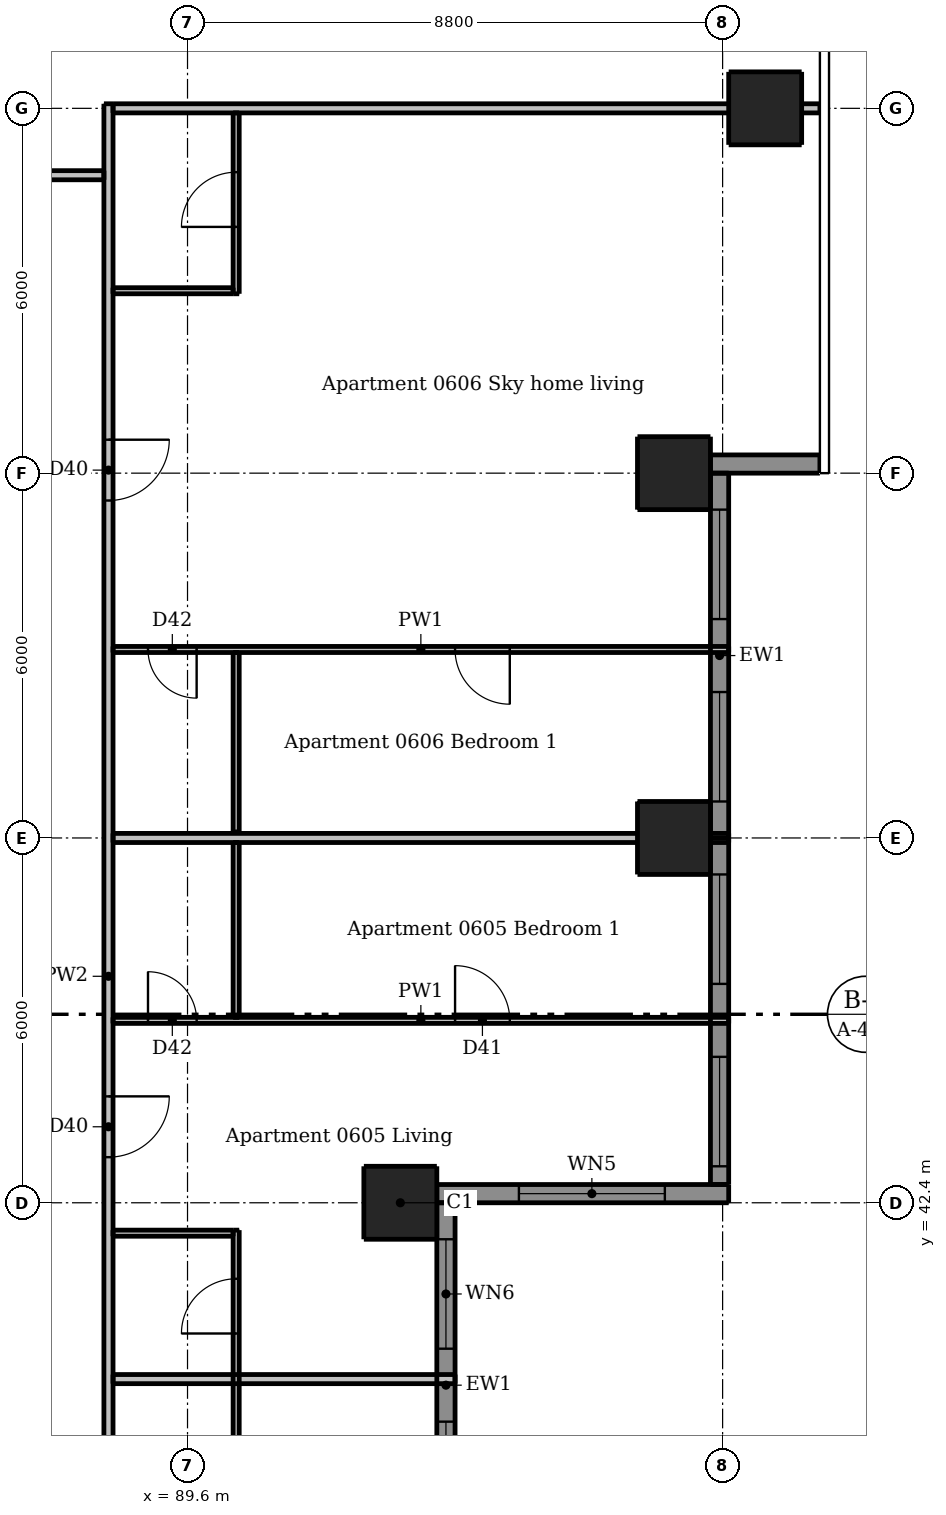
"""IFC4 building model, lengths in metres.
Left out: names, types, materials, properties, quantities, classifications, styles, units other than length and angle.
Written with IfcOpenShell. Run it as: python <this file> out.ifc"""

import sys

from ifc_helpers import new_model, si_unit, direction, frame, frame_2d, origin, origin_2d, place, context, subcontext, project, spatial, rectangle, extrude, element, fill, save


model = new_model("IFC4")
c1 = context("Model", 3, precision=1e-05, world=origin(), true_north=direction((0.0, 1.0)))
c2 = subcontext(c1, "Body", "Model", "MODEL_VIEW")
j1 = project(units=[si_unit("LENGTHUNIT", "METRE"), si_unit("PLANEANGLEUNIT", "RADIAN")], contexts=[c1])
p1 = place(None, origin())
s1 = spatial("IfcSite", under=j1, at=p1, CompositionType="ELEMENT")
p2 = place(p1, origin())
s2 = spatial("IfcBuilding", under=s1, at=p2, CompositionType="ELEMENT")
p3 = place(p2, frame((0.0, 0.0, 26.8)))
s3 = spatial("IfcBuildingStorey", under=s2, at=p3, CompositionType="ELEMENT", Elevation=26.8)
for number, where, z_axis, x_axis in (
    (1, (93.1, 42.4, 0.0), (0.0, 0.0, 1.0), (1.0, 0.0, 0.0)),
    (2, (97.6, 48.4, 0.0), (0.0, 0.0, 1.0), (1.0, 0.0, 0.0)),
    (3, (97.6, 54.4, 0.0), (0.0, 0.0, 1.0), (1.0, 0.0, 0.0)),
    (4, (99.1, 60.4, 0.0), (0.0, 0.0, 1.0), (1.0, 0.0, 0.0)),
):
    element("IfcColumn", number, at=place(p3, frame(where, z_axis=z_axis, x_axis=x_axis)), inside=s3, PredefinedType="COLUMN", context=c2, shape_type="SweptSolid", body=[
        extrude(rectangle(XDim=1.2, YDim=1.2, at=origin_2d()), origin(), (0.0, 0.0, 1.0), 3.05),
    ])
p4 = place(p3, frame((93.7, 42.55, 0.0), z_axis=(0.0, 0.0, 1.0), x_axis=(1.0, 0.0, 0.0)))
e5 = element("IfcWall", 5, at=p4, inside=s3, PredefinedType="SOLIDWALL", context=c2, shape_type="SweptSolid", body=[
    extrude(rectangle(XDim=4.8, YDim=0.3, at=frame_2d((2.4, 0.0))), origin(), (0.0, 0.0, 1.0), 3.05),
])
p5 = place(p4, frame((1.35, 0.0, 0.15)))
e6 = element("IfcOpeningElement", 6, at=p5, cuts=e5, PredefinedType="OPENING", context=c2, shape_type="SweptSolid", body=[
    extrude(rectangle(XDim=2.4, YDim=2.1, at=frame_2d((1.2, 1.05))), frame((0.0, 0.16, 0.0), z_axis=(0.0, -1.0, 0.0), x_axis=(1.0, 0.0, 0.0)), (0.0, 0.0, 1.0), 0.32),
])
p6 = place(p3, frame((98.2, 54.55, 0.0), z_axis=(0.0, 0.0, 1.0), x_axis=(1.0, 0.0, 0.0)))
e7 = element("IfcWall", 7, at=p6, inside=s3, PredefinedType="SOLIDWALL", context=c2, shape_type="SweptSolid", body=[
    extrude(rectangle(XDim=1.8, YDim=0.3, at=frame_2d((0.9, 0.0))), origin(), (0.0, 0.0, 1.0), 3.05),
])
p7 = place(p3, frame((93.85, 36.4, 0.0), z_axis=(0.0, 0.0, 1.0), x_axis=(0.0, 1.0, 0.0)))
e8 = element("IfcWall", 8, at=p7, inside=s3, PredefinedType="SOLIDWALL", context=c2, shape_type="SweptSolid", body=[
    extrude(rectangle(XDim=6.0, YDim=0.3, at=frame_2d((3.0, 0.0))), origin(), (0.0, 0.0, 1.0), 3.05),
])
p8 = place(p7, frame((0.6, 0.0, 0.15)))
e9 = element("IfcOpeningElement", 9, at=p8, cuts=e8, PredefinedType="OPENING", context=c2, shape_type="SweptSolid", body=[
    extrude(rectangle(XDim=1.8, YDim=2.1, at=frame_2d((0.9, 1.05))), frame((0.0, 0.16, 0.0), z_axis=(0.0, -1.0, 0.0), x_axis=(1.0, 0.0, 0.0)), (0.0, 0.0, 1.0), 0.32),
])
p9 = place(p7, frame((3.6, 0.0, 0.15)))
e10 = element("IfcOpeningElement", 10, at=p9, cuts=e8, PredefinedType="OPENING", context=c2, shape_type="SweptSolid", body=[
    extrude(rectangle(XDim=1.8, YDim=2.1, at=frame_2d((0.9, 1.05))), frame((0.0, 0.16, 0.0), z_axis=(0.0, -1.0, 0.0), x_axis=(1.0, 0.0, 0.0)), (0.0, 0.0, 1.0), 0.32),
])
p10 = place(p3, frame((98.35, 42.7, 0.0), z_axis=(0.0, 0.0, 1.0), x_axis=(0.0, 1.0, 0.0)))
e11 = element("IfcWall", 11, at=p10, inside=s3, PredefinedType="SOLIDWALL", context=c2, shape_type="SweptSolid", body=[
    extrude(rectangle(XDim=5.7, YDim=0.3, at=frame_2d((2.85, 0.0))), origin(), (0.0, 0.0, 1.0), 3.05),
])
p11 = place(p10, frame((0.3, 0.0, 0.15)))
e12 = element("IfcOpeningElement", 12, at=p11, cuts=e11, PredefinedType="OPENING", context=c2, shape_type="SweptSolid", body=[
    extrude(rectangle(XDim=1.8, YDim=2.1, at=frame_2d((0.9, 1.05))), frame((0.0, 0.16, 0.0), z_axis=(0.0, -1.0, 0.0), x_axis=(1.0, 0.0, 0.0)), (0.0, 0.0, 1.0), 0.32),
])
p12 = place(p10, frame((3.3, 0.0, 0.15)))
e13 = element("IfcOpeningElement", 13, at=p12, cuts=e11, PredefinedType="OPENING", context=c2, shape_type="SweptSolid", body=[
    extrude(rectangle(XDim=1.8, YDim=2.1, at=frame_2d((0.9, 1.05))), frame((0.0, 0.16, 0.0), z_axis=(0.0, -1.0, 0.0), x_axis=(1.0, 0.0, 0.0)), (0.0, 0.0, 1.0), 0.32),
])
p13 = place(p3, frame((98.35, 48.4, 0.0), z_axis=(0.0, 0.0, 1.0), x_axis=(0.0, 1.0, 0.0)))
e14 = element("IfcWall", 14, at=p13, inside=s3, PredefinedType="SOLIDWALL", context=c2, shape_type="SweptSolid", body=[
    extrude(rectangle(XDim=6.0, YDim=0.3, at=frame_2d((3.0, 0.0))), origin(), (0.0, 0.0, 1.0), 3.05),
])
p14 = place(p13, frame((0.6, 0.0, 0.15)))
e15 = element("IfcOpeningElement", 15, at=p14, cuts=e14, PredefinedType="OPENING", context=c2, shape_type="SweptSolid", body=[
    extrude(rectangle(XDim=1.8, YDim=2.1, at=frame_2d((0.9, 1.05))), frame((0.0, 0.16, 0.0), z_axis=(0.0, -1.0, 0.0), x_axis=(1.0, 0.0, 0.0)), (0.0, 0.0, 1.0), 0.32),
])
p15 = place(p13, frame((3.6, 0.0, 0.15)))
e16 = element("IfcOpeningElement", 16, at=p15, cuts=e14, PredefinedType="OPENING", context=c2, shape_type="SweptSolid", body=[
    extrude(rectangle(XDim=1.8, YDim=2.1, at=frame_2d((0.9, 1.05))), frame((0.0, 0.16, 0.0), z_axis=(0.0, -1.0, 0.0), x_axis=(1.0, 0.0, 0.0)), (0.0, 0.0, 1.0), 0.32),
])
p16 = place(p3, frame((90.4, 33.45, 0.0), z_axis=(0.0, 0.0, 1.0), x_axis=(0.0, 1.0, 0.0)))
e17 = element("IfcWall", 17, at=p16, inside=s3, PredefinedType="PARTITIONING", context=c2, shape_type="SweptSolid", body=[
    extrude(rectangle(XDim=8.5, YDim=0.1, at=frame_2d((4.25, 0.0))), origin(), (0.0, 0.0, 1.0), 3.05),
])
p17 = place(p16, frame((3.8, 0.0, 0.0)))
e18 = element("IfcOpeningElement", 18, at=p17, cuts=e17, PredefinedType="OPENING", context=c2, shape_type="SweptSolid", body=[
    extrude(rectangle(XDim=0.8, YDim=2.1, at=frame_2d((0.4, 1.05))), frame((0.0, 0.06, 0.0), z_axis=(0.0, -1.0, 0.0), x_axis=(1.0, 0.0, 0.0)), (0.0, 0.0, 1.0), 0.12),
])
p18 = place(p16, frame((6.8, 0.0, 0.0)))
e19 = element("IfcOpeningElement", 19, at=p18, cuts=e17, PredefinedType="OPENING", context=c2, shape_type="SweptSolid", body=[
    extrude(rectangle(XDim=0.9, YDim=2.1, at=frame_2d((0.45, 1.05))), frame((0.0, 0.06, 0.0), z_axis=(0.0, -1.0, 0.0), x_axis=(1.0, 0.0, 0.0)), (0.0, 0.0, 1.0), 0.12),
])
p19 = place(p3, frame((90.4, 45.45, 0.0), z_axis=(0.0, 0.0, 1.0), x_axis=(0.0, 1.0, 0.0)))
e20 = element("IfcWall", 20, at=p19, inside=s3, PredefinedType="PARTITIONING", context=c2, shape_type="SweptSolid", body=[
    extrude(rectangle(XDim=2.875, YDim=0.1, at=frame_2d((1.438, 0.0))), origin(), (0.0, 0.0, 1.0), 3.05),
])
p20 = place(p3, frame((90.4, 48.5, 0.0), z_axis=(0.0, 0.0, 1.0), x_axis=(0.0, 1.0, 0.0)))
e21 = element("IfcWall", 21, at=p20, inside=s3, PredefinedType="PARTITIONING", context=c2, shape_type="SweptSolid", body=[
    extrude(rectangle(XDim=2.95, YDim=0.1, at=frame_2d((1.475, 0.0))), origin(), (0.0, 0.0, 1.0), 3.05),
])
p21 = place(p3, frame((90.4, 57.35, 0.0), z_axis=(0.0, 0.0, 1.0), x_axis=(0.0, 1.0, 0.0)))
e22 = element("IfcWall", 22, at=p21, inside=s3, PredefinedType="PARTITIONING", context=c2, shape_type="SweptSolid", body=[
    extrude(rectangle(XDim=2.975, YDim=0.1, at=frame_2d((1.487, 0.0))), origin(), (0.0, 0.0, 1.0), 3.05),
])
p22 = place(p21, frame((1.1, 0.0, 0.0)))
e23 = element("IfcOpeningElement", 23, at=p22, cuts=e22, PredefinedType="OPENING", context=c2, shape_type="SweptSolid", body=[
    extrude(rectangle(XDim=0.9, YDim=2.1, at=frame_2d((0.45, 1.05))), frame((0.0, 0.06, 0.0), z_axis=(0.0, -1.0, 0.0), x_axis=(1.0, 0.0, 0.0)), (0.0, 0.0, 1.0), 0.12),
])
p23 = place(p3, frame((88.375, 57.4, 0.0), z_axis=(0.0, 0.0, 1.0), x_axis=(1.0, 0.0, 0.0)))
e24 = element("IfcWall", 24, at=p23, inside=s3, PredefinedType="PARTITIONING", context=c2, shape_type="SweptSolid", body=[
    extrude(rectangle(XDim=1.975, YDim=0.1, at=frame_2d((0.988, 0.0))), origin(), (0.0, 0.0, 1.0), 3.05),
])
p24 = place(p3, frame((98.5, 51.5, 0.0), z_axis=(0.0, 0.0, 1.0), x_axis=(-1.0, 0.0, 0.0)))
e25 = element("IfcWall", 25, at=p24, inside=s3, PredefinedType="PARTITIONING", context=c2, shape_type="SweptSolid", body=[
    extrude(rectangle(XDim=10.125, YDim=0.1, at=frame_2d((5.062, 0.0))), origin(), (0.0, 0.0, 1.0), 3.05),
])
p25 = place(p24, frame((3.6, 0.0, 0.0)))
e26 = element("IfcOpeningElement", 26, at=p25, cuts=e25, PredefinedType="OPENING", context=c2, shape_type="SweptSolid", body=[
    extrude(rectangle(XDim=0.9, YDim=2.1, at=frame_2d((0.45, 1.05))), frame((0.0, 0.06, 0.0), z_axis=(0.0, -1.0, 0.0), x_axis=(1.0, 0.0, 0.0)), (0.0, 0.0, 1.0), 0.12),
])
p26 = place(p24, frame((8.75, 0.0, 0.0)))
e27 = element("IfcOpeningElement", 27, at=p26, cuts=e25, PredefinedType="OPENING", context=c2, shape_type="SweptSolid", body=[
    extrude(rectangle(XDim=0.8, YDim=2.1, at=frame_2d((0.4, 1.05))), frame((0.0, 0.06, 0.0), z_axis=(0.0, -1.0, 0.0), x_axis=(1.0, 0.0, 0.0)), (0.0, 0.0, 1.0), 0.12),
])
p27 = place(p3, frame((88.375, 45.4, 0.0), z_axis=(0.0, 0.0, 1.0), x_axis=(1.0, 0.0, 0.0)))
e28 = element("IfcWall", 28, at=p27, inside=s3, PredefinedType="PARTITIONING", context=c2, shape_type="SweptSolid", body=[
    extrude(rectangle(XDim=10.125, YDim=0.1, at=frame_2d((5.062, 0.0))), origin(), (0.0, 0.0, 1.0), 3.05),
])
p28 = place(p27, frame((5.625, 0.0, 0.0)))
e29 = element("IfcOpeningElement", 29, at=p28, cuts=e28, PredefinedType="OPENING", context=c2, shape_type="SweptSolid", body=[
    extrude(rectangle(XDim=0.9, YDim=2.1, at=frame_2d((0.45, 1.05))), frame((0.0, 0.06, 0.0), z_axis=(0.0, -1.0, 0.0), x_axis=(1.0, 0.0, 0.0)), (0.0, 0.0, 1.0), 0.12),
])
p29 = place(p27, frame((0.575, 0.0, 0.0)))
e30 = element("IfcOpeningElement", 30, at=p29, cuts=e28, PredefinedType="OPENING", context=c2, shape_type="SweptSolid", body=[
    extrude(rectangle(XDim=0.8, YDim=2.1, at=frame_2d((0.4, 1.05))), frame((0.0, 0.06, 0.0), z_axis=(0.0, -1.0, 0.0), x_axis=(1.0, 0.0, 0.0)), (0.0, 0.0, 1.0), 0.12),
])
p30 = place(p3, frame((88.375, 41.9, 0.0), z_axis=(0.0, 0.0, 1.0), x_axis=(1.0, 0.0, 0.0)))
e31 = element("IfcWall", 31, at=p30, inside=s3, PredefinedType="PARTITIONING", context=c2, shape_type="SweptSolid", body=[
    extrude(rectangle(XDim=1.975, YDim=0.1, at=frame_2d((0.988, 0.0))), origin(), (0.0, 0.0, 1.0), 3.05),
])
p31 = place(p3, frame((88.3, 60.475, 0.0), z_axis=(0.0, 0.0, 1.0), x_axis=(0.0, -1.0, 0.0)))
e32 = element("IfcWall", 32, at=p31, inside=s3, PredefinedType="PARTITIONING", context=c2, shape_type="SweptSolid", body=[
    extrude(rectangle(XDim=28.7, YDim=0.15, at=frame_2d((14.35, 0.0))), origin(), (0.0, 0.0, 1.0), 3.05),
])
p32 = place(p31, frame((27.425, 0.0, 0.0)))
e33 = element("IfcOpeningElement", 33, at=p32, cuts=e32, PredefinedType="OPENING", context=c2, shape_type="SweptSolid", body=[
    extrude(rectangle(XDim=1.0, YDim=2.1, at=frame_2d((0.5, 1.05))), frame((0.0, 0.085, 0.0), z_axis=(0.0, -1.0, 0.0), x_axis=(1.0, 0.0, 0.0)), (0.0, 0.0, 1.0), 0.17),
])
p33 = place(p31, frame((16.325, 0.0, 0.0)))
e34 = element("IfcOpeningElement", 34, at=p33, cuts=e32, PredefinedType="OPENING", context=c2, shape_type="SweptSolid", body=[
    extrude(rectangle(XDim=1.0, YDim=2.1, at=frame_2d((0.5, 1.05))), frame((0.0, 0.085, 0.0), z_axis=(0.0, -1.0, 0.0), x_axis=(1.0, 0.0, 0.0)), (0.0, 0.0, 1.0), 0.17),
])
p34 = place(p31, frame((5.525, 0.0, 0.0)))
e35 = element("IfcOpeningElement", 35, at=p34, cuts=e32, PredefinedType="OPENING", context=c2, shape_type="SweptSolid", body=[
    extrude(rectangle(XDim=1.0, YDim=2.1, at=frame_2d((0.5, 1.05))), frame((0.0, 0.085, 0.0), z_axis=(0.0, -1.0, 0.0), x_axis=(1.0, 0.0, 0.0)), (0.0, 0.0, 1.0), 0.17),
])
p35 = place(p3, frame((88.375, 60.4, 0.0), z_axis=(0.0, 0.0, 1.0), x_axis=(1.0, 0.0, 0.0)))
e36 = element("IfcWall", 36, at=p35, inside=s3, PredefinedType="PARTITIONING", context=c2, shape_type="SweptSolid", body=[
    extrude(rectangle(XDim=11.625, YDim=0.15, at=frame_2d((5.812, 0.0))), origin(), (0.0, 0.0, 1.0), 2.516),
])
p36 = place(p3, frame((59.675, 59.3, 0.0), z_axis=(0.0, 0.0, 1.0), x_axis=(1.0, 0.0, 0.0)))
e37 = element("IfcWall", 37, at=p36, inside=s3, PredefinedType="PARTITIONING", context=c2, shape_type="SweptSolid", body=[
    extrude(rectangle(XDim=28.55, YDim=0.15, at=frame_2d((14.275, 0.0))), origin(), (0.0, 0.0, 1.0), 3.05),
])
p37 = place(p36, frame((2.425, 0.0, 0.0)))
e38 = element("IfcOpeningElement", 38, at=p37, cuts=e37, PredefinedType="OPENING", context=c2, shape_type="SweptSolid", body=[
    extrude(rectangle(XDim=1.0, YDim=2.1, at=frame_2d((0.5, 1.05))), frame((0.0, 0.085, 0.0), z_axis=(0.0, -1.0, 0.0), x_axis=(1.0, 0.0, 0.0)), (0.0, 0.0, 1.0), 0.17),
])
p38 = place(p36, frame((8.425, 0.0, 0.0)))
e39 = element("IfcOpeningElement", 39, at=p38, cuts=e37, PredefinedType="OPENING", context=c2, shape_type="SweptSolid", body=[
    extrude(rectangle(XDim=1.0, YDim=2.1, at=frame_2d((0.5, 1.05))), frame((0.0, 0.085, 0.0), z_axis=(0.0, -1.0, 0.0), x_axis=(1.0, 0.0, 0.0)), (0.0, 0.0, 1.0), 0.17),
])
p39 = place(p36, frame((14.425, 0.0, 0.0)))
e40 = element("IfcOpeningElement", 40, at=p39, cuts=e37, PredefinedType="OPENING", context=c2, shape_type="SweptSolid", body=[
    extrude(rectangle(XDim=1.0, YDim=2.1, at=frame_2d((0.5, 1.05))), frame((0.0, 0.085, 0.0), z_axis=(0.0, -1.0, 0.0), x_axis=(1.0, 0.0, 0.0)), (0.0, 0.0, 1.0), 0.17),
])
p40 = place(p36, frame((25.775, 0.0, 0.0)))
e41 = element("IfcOpeningElement", 41, at=p40, cuts=e37, PredefinedType="OPENING", context=c2, shape_type="SweptSolid", body=[
    extrude(rectangle(XDim=1.0, YDim=2.1, at=frame_2d((0.5, 1.05))), frame((0.0, 0.085, 0.0), z_axis=(0.0, -1.0, 0.0), x_axis=(1.0, 0.0, 0.0)), (0.0, 0.0, 1.0), 0.17),
])
p41 = place(p3, frame((88.375, 48.4, 0.0), z_axis=(0.0, 0.0, 1.0), x_axis=(1.0, 0.0, 0.0)))
e42 = element("IfcWall", 42, at=p41, inside=s3, PredefinedType="PARTITIONING", context=c2, shape_type="SweptSolid", body=[
    extrude(rectangle(XDim=10.125, YDim=0.15, at=frame_2d((5.062, 0.0))), origin(), (0.0, 0.0, 1.0), 2.516),
])
p42 = place(p3, frame((88.375, 39.5, 0.0), z_axis=(0.0, 0.0, 1.0), x_axis=(1.0, 0.0, 0.0)))
e43 = element("IfcWall", 43, at=p42, inside=s3, PredefinedType="PARTITIONING", context=c2, shape_type="SweptSolid", body=[
    extrude(rectangle(XDim=5.625, YDim=0.15, at=frame_2d((2.812, 0.0))), origin(), (0.0, 0.0, 1.0), 3.05),
])
p43 = place(p5, origin())
e44 = element("IfcWindow", 44, at=p43, inside=s3, PartitioningType="DOUBLE_PANEL_VERTICAL", PredefinedType="WINDOW", context=c2, shape_type="SweptSolid", body=[
    extrude(rectangle(XDim=2.4, YDim=2.1, at=frame_2d((1.2, 1.05))), frame((0.0, 0.03, 0.0), z_axis=(0.0, -1.0, 0.0), x_axis=(1.0, 0.0, 0.0)), (0.0, 0.0, 1.0), 0.06),
])
fill(e6, e44)
p44 = place(p8, origin())
e45 = element("IfcWindow", 45, at=p44, inside=s3, PartitioningType="DOUBLE_PANEL_VERTICAL", PredefinedType="WINDOW", context=c2, shape_type="SweptSolid", body=[
    extrude(rectangle(XDim=1.8, YDim=2.1, at=frame_2d((0.9, 1.05))), frame((0.0, 0.03, 0.0), z_axis=(0.0, -1.0, 0.0), x_axis=(1.0, 0.0, 0.0)), (0.0, 0.0, 1.0), 0.06),
])
fill(e9, e45)
p45 = place(p9, origin())
e46 = element("IfcWindow", 46, at=p45, inside=s3, PartitioningType="DOUBLE_PANEL_VERTICAL", PredefinedType="WINDOW", context=c2, shape_type="SweptSolid", body=[
    extrude(rectangle(XDim=1.8, YDim=2.1, at=frame_2d((0.9, 1.05))), frame((0.0, 0.03, 0.0), z_axis=(0.0, -1.0, 0.0), x_axis=(1.0, 0.0, 0.0)), (0.0, 0.0, 1.0), 0.06),
])
fill(e10, e46)
p46 = place(p11, origin())
e47 = element("IfcWindow", 47, at=p46, inside=s3, PartitioningType="DOUBLE_PANEL_VERTICAL", PredefinedType="WINDOW", context=c2, shape_type="SweptSolid", body=[
    extrude(rectangle(XDim=1.8, YDim=2.1, at=frame_2d((0.9, 1.05))), frame((0.0, 0.03, 0.0), z_axis=(0.0, -1.0, 0.0), x_axis=(1.0, 0.0, 0.0)), (0.0, 0.0, 1.0), 0.06),
])
fill(e12, e47)
p47 = place(p12, origin())
e48 = element("IfcWindow", 48, at=p47, inside=s3, PartitioningType="DOUBLE_PANEL_VERTICAL", PredefinedType="WINDOW", context=c2, shape_type="SweptSolid", body=[
    extrude(rectangle(XDim=1.8, YDim=2.1, at=frame_2d((0.9, 1.05))), frame((0.0, 0.03, 0.0), z_axis=(0.0, -1.0, 0.0), x_axis=(1.0, 0.0, 0.0)), (0.0, 0.0, 1.0), 0.06),
])
fill(e13, e48)
p48 = place(p14, origin())
e49 = element("IfcWindow", 49, at=p48, inside=s3, PartitioningType="DOUBLE_PANEL_VERTICAL", PredefinedType="WINDOW", context=c2, shape_type="SweptSolid", body=[
    extrude(rectangle(XDim=1.8, YDim=2.1, at=frame_2d((0.9, 1.05))), frame((0.0, 0.03, 0.0), z_axis=(0.0, -1.0, 0.0), x_axis=(1.0, 0.0, 0.0)), (0.0, 0.0, 1.0), 0.06),
])
fill(e15, e49)
p49 = place(p15, origin())
e50 = element("IfcWindow", 50, at=p49, inside=s3, PartitioningType="DOUBLE_PANEL_VERTICAL", PredefinedType="WINDOW", context=c2, shape_type="SweptSolid", body=[
    extrude(rectangle(XDim=1.8, YDim=2.1, at=frame_2d((0.9, 1.05))), frame((0.0, 0.03, 0.0), z_axis=(0.0, -1.0, 0.0), x_axis=(1.0, 0.0, 0.0)), (0.0, 0.0, 1.0), 0.06),
])
fill(e16, e50)
p50 = place(p33, origin())
e51 = element("IfcDoor", 51, at=p50, inside=s3, OperationType="SINGLE_SWING_LEFT", PredefinedType="DOOR", context=c2, shape_type="SweptSolid", body=[
    extrude(rectangle(XDim=1.0, YDim=2.1, at=frame_2d((0.5, 1.05))), frame((0.0, 0.025, 0.0), z_axis=(0.0, -1.0, 0.0), x_axis=(1.0, 0.0, 0.0)), (0.0, 0.0, 1.0), 0.05),
])
fill(e34, e51)
p51 = place(p18, origin())
e52 = element("IfcDoor", 52, at=p51, inside=s3, OperationType="SINGLE_SWING_LEFT", PredefinedType="DOOR", context=c2, shape_type="SweptSolid", body=[
    extrude(rectangle(XDim=0.9, YDim=2.1, at=frame_2d((0.45, 1.05))), frame((0.0, 0.025, 0.0), z_axis=(0.0, -1.0, 0.0), x_axis=(1.0, 0.0, 0.0)), (0.0, 0.0, 1.0), 0.05),
])
fill(e19, e52)
p52 = place(p28, origin())
e53 = element("IfcDoor", 53, at=p52, inside=s3, OperationType="SINGLE_SWING_LEFT", PredefinedType="DOOR", context=c2, shape_type="SweptSolid", body=[
    extrude(rectangle(XDim=0.9, YDim=2.1, at=frame_2d((0.45, 1.05))), frame((0.0, 0.025, 0.0), z_axis=(0.0, -1.0, 0.0), x_axis=(1.0, 0.0, 0.0)), (0.0, 0.0, 1.0), 0.05),
])
fill(e29, e53)
p53 = place(p29, origin())
e54 = element("IfcDoor", 54, at=p53, inside=s3, OperationType="SINGLE_SWING_LEFT", PredefinedType="DOOR", context=c2, shape_type="SweptSolid", body=[
    extrude(rectangle(XDim=0.8, YDim=2.1, at=frame_2d((0.4, 1.05))), frame((0.0, 0.025, 0.0), z_axis=(0.0, -1.0, 0.0), x_axis=(1.0, 0.0, 0.0)), (0.0, 0.0, 1.0), 0.05),
])
fill(e30, e54)
p54 = place(p34, origin())
e55 = element("IfcDoor", 55, at=p54, inside=s3, OperationType="SINGLE_SWING_LEFT", PredefinedType="DOOR", context=c2, shape_type="SweptSolid", body=[
    extrude(rectangle(XDim=1.0, YDim=2.1, at=frame_2d((0.5, 1.05))), frame((0.0, 0.025, 0.0), z_axis=(0.0, -1.0, 0.0), x_axis=(1.0, 0.0, 0.0)), (0.0, 0.0, 1.0), 0.05),
])
fill(e35, e55)
p55 = place(p22, origin())
e56 = element("IfcDoor", 56, at=p55, inside=s3, OperationType="SINGLE_SWING_LEFT", PredefinedType="DOOR", context=c2, shape_type="SweptSolid", body=[
    extrude(rectangle(XDim=0.9, YDim=2.1, at=frame_2d((0.45, 1.05))), frame((0.0, 0.025, 0.0), z_axis=(0.0, -1.0, 0.0), x_axis=(1.0, 0.0, 0.0)), (0.0, 0.0, 1.0), 0.05),
])
fill(e23, e56)
p56 = place(p25, origin())
e57 = element("IfcDoor", 57, at=p56, inside=s3, OperationType="SINGLE_SWING_LEFT", PredefinedType="DOOR", context=c2, shape_type="SweptSolid", body=[
    extrude(rectangle(XDim=0.9, YDim=2.1, at=frame_2d((0.45, 1.05))), frame((0.0, 0.025, 0.0), z_axis=(0.0, -1.0, 0.0), x_axis=(1.0, 0.0, 0.0)), (0.0, 0.0, 1.0), 0.05),
])
fill(e26, e57)
p57 = place(p26, origin())
e58 = element("IfcDoor", 58, at=p57, inside=s3, OperationType="SINGLE_SWING_LEFT", PredefinedType="DOOR", context=c2, shape_type="SweptSolid", body=[
    extrude(rectangle(XDim=0.8, YDim=2.1, at=frame_2d((0.4, 1.05))), frame((0.0, 0.025, 0.0), z_axis=(0.0, -1.0, 0.0), x_axis=(1.0, 0.0, 0.0)), (0.0, 0.0, 1.0), 0.05),
])
fill(e27, e58)
save(model, sys.argv[1])
